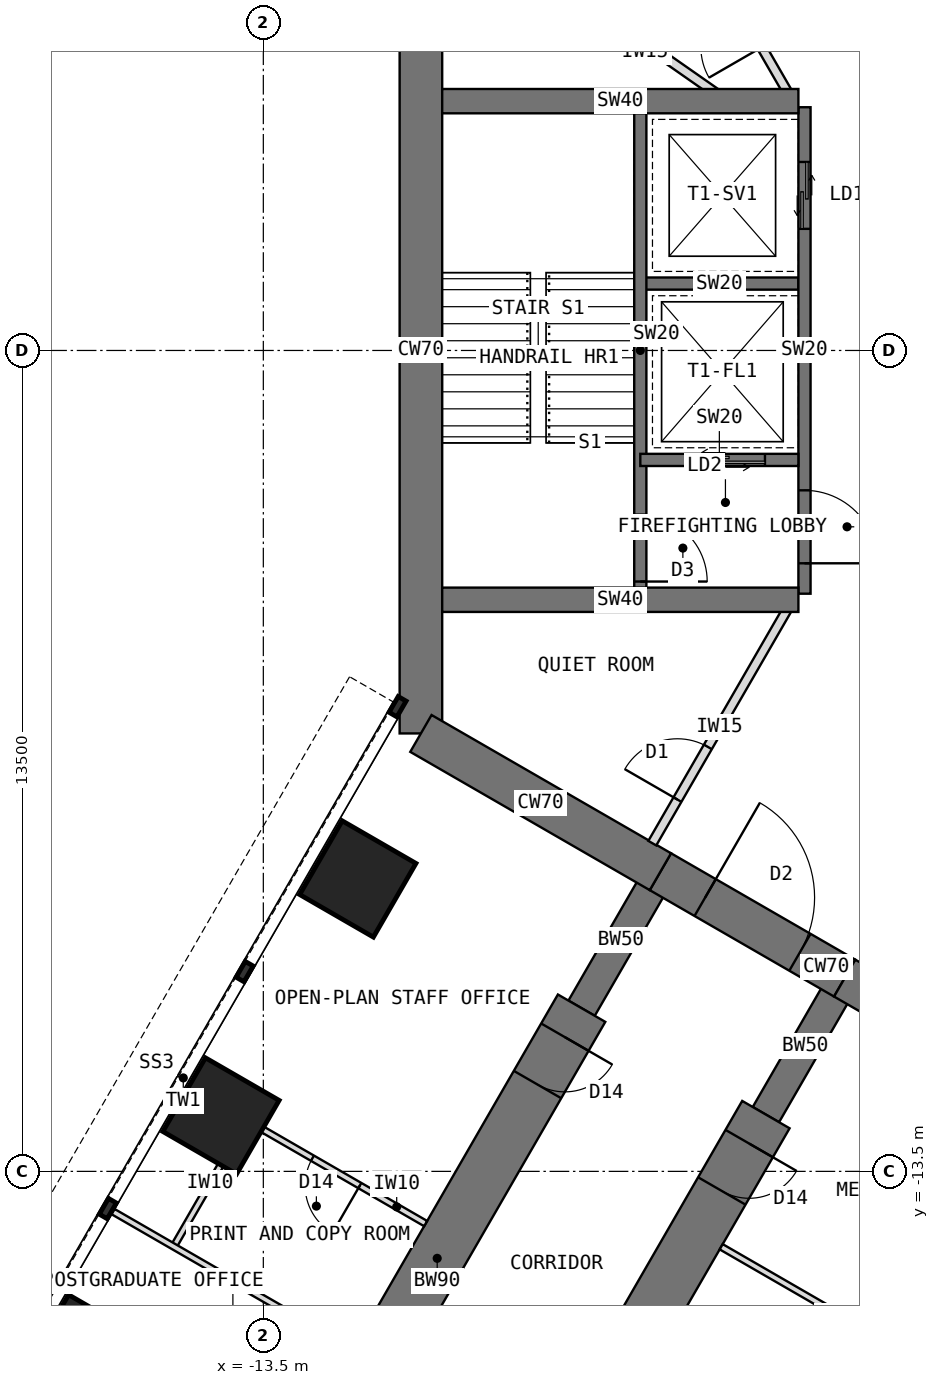
"""IFC4 building model, lengths in metres.
Left out: names, types, materials, properties, quantities, classifications, styles, units other than length and angle.
Written with IfcOpenShell. Run it as: python <this file> out.ifc"""

import sys

from ifc_helpers import new_model, si_unit, direction, frame, frame_2d, origin, origin_2d, place, context, subcontext, project, spatial, rectangle, extrude, element, fill, save


model = new_model("IFC4")
c1 = context("Model", 3, precision=1e-05, world=origin(), true_north=direction((0.0, 1.0)))
c2 = subcontext(c1, "Body", "Model", "MODEL_VIEW")
j1 = project(units=[si_unit("LENGTHUNIT", "METRE"), si_unit("PLANEANGLEUNIT", "RADIAN")], contexts=[c1])
p1 = place(None, origin())
s1 = spatial("IfcSite", under=j1, at=p1, CompositionType="ELEMENT")
p2 = place(p1, origin())
s2 = spatial("IfcBuilding", under=s1, at=p2, CompositionType="ELEMENT")
p3 = place(p2, frame((0.0, 0.0, 88.5)))
s3 = spatial("IfcBuildingStorey", under=s2, at=p3, CompositionType="ELEMENT", Elevation=88.5)
p4 = place(p3, frame((-10.908, 6.298, 0.0), z_axis=(0.0, 0.0, 1.0), x_axis=(0.0, -1.0, 0.0)))
e1 = element("IfcWall", 1, at=p4, inside=s3, PredefinedType="SHEAR", context=c2, shape_type="SweptSolid", body=[
    extrude(rectangle(XDim=12.596, YDim=0.7, at=frame_2d((6.298, 0.0))), origin(), (0.0, 0.0, 1.0), 4.0),
])
p5 = place(p3, frame((-10.908, -6.298, 0.0), z_axis=(0.0, 0.0, 1.0), x_axis=(0.866034513004, -0.499984222037, 0.0)))
e2 = element("IfcWall", 2, at=p5, inside=s3, PredefinedType="SHEAR", context=c2, shape_type="SweptSolid", body=[
    extrude(rectangle(XDim=4.548, YDim=0.7, at=frame_2d((2.274, 0.0))), origin(), (0.0, 0.0, 1.0), 4.0),
])
p6 = place(p3, frame((-6.97, -8.572, 0.0), z_axis=(0.0, 0.0, 1.0), x_axis=(0.866019471182, -0.500010275428, 0.0)))
e3 = element("IfcWall", 3, at=p6, inside=s3, PredefinedType="SHEAR", context=c2, shape_type="SweptSolid", body=[
    extrude(rectangle(XDim=3.5, YDim=0.7, at=frame_2d((1.75, 0.0))), origin(), (0.0, 0.0, 1.0), 4.0),
])
p7 = place(p6, frame((0.85, 0.0, 0.0)))
e4 = element("IfcOpeningElement", 4, at=p7, cuts=e3, PredefinedType="OPENING", context=c2, shape_type="SweptSolid", body=[
    extrude(rectangle(XDim=1.8, YDim=2.1, at=frame_2d((0.9, 1.05))), frame((0.0, 0.36, 0.0), z_axis=(0.0, -1.0, 0.0), x_axis=(1.0, 0.0, 0.0)), (0.0, 0.0, 1.0), 0.72),
])
p8 = place(p3, frame((-3.939, -10.322, 0.0), z_axis=(0.0, 0.0, 1.0), x_axis=(0.866011268655, -0.500024481964, 0.0)))
e5 = element("IfcWall", 5, at=p8, inside=s3, PredefinedType="SHEAR", context=c2, shape_type="SweptSolid", body=[
    extrude(rectangle(XDim=4.548, YDim=0.7, at=frame_2d((2.274, 0.0))), origin(), (0.0, 0.0, 1.0), 4.0),
])
p9 = place(p3, frame((-3.939, -10.322, 0.0), z_axis=(0.0, 0.0, 1.0), x_axis=(-0.499918158782, -0.866072649678, 0.0)))
e6 = element("IfcWall", 6, at=p9, inside=s3, PredefinedType="SHEAR", context=c2, shape_type="SweptSolid", body=[
    extrude(rectangle(XDim=2.592, YDim=0.5, at=frame_2d((1.296, 0.0))), origin(), (0.0, 0.0, 1.0), 4.0),
])
p10 = place(p3, frame((-5.234, -12.566, 0.0), z_axis=(0.0, 0.0, 1.0), x_axis=(-0.499997557548, -0.86602681393, 0.0)))
e7 = element("IfcWall", 7, at=p10, inside=s3, PredefinedType="SHEAR", context=c2, shape_type="SweptSolid", body=[
    extrude(rectangle(XDim=9.5, YDim=0.9, at=frame_2d((4.75, 0.0))), origin(), (0.0, 0.0, 1.0), 4.0),
])
p11 = place(p10, frame((0.55, 0.0, 0.0)))
e8 = element("IfcOpeningElement", 8, at=p11, cuts=e7, PredefinedType="OPENING", context=c2, shape_type="SweptSolid", body=[
    extrude(rectangle(XDim=0.9, YDim=2.1, at=frame_2d((0.45, 1.05))), frame((0.0, 0.46, 0.0), z_axis=(0.0, -1.0, 0.0), x_axis=(1.0, 0.0, 0.0)), (0.0, 0.0, 1.0), 0.92),
])
p12 = place(p10, frame((7.3, 0.0, 0.0)))
e9 = element("IfcOpeningElement", 9, at=p12, cuts=e7, PredefinedType="OPENING", context=c2, shape_type="SweptSolid", body=[
    extrude(rectangle(XDim=0.9, YDim=2.1, at=frame_2d((0.45, 1.05))), frame((0.0, 0.46, 0.0), z_axis=(0.0, -1.0, 0.0), x_axis=(1.0, 0.0, 0.0)), (0.0, 0.0, 1.0), 0.92),
])
p13 = place(p3, frame((-6.97, -8.572, 0.0), z_axis=(0.0, 0.0, 1.0), x_axis=(-0.499988811324, -0.866031863473, 0.0)))
e10 = element("IfcWall", 10, at=p13, inside=s3, PredefinedType="SHEAR", context=c2, shape_type="SweptSolid", body=[
    extrude(rectangle(XDim=2.592, YDim=0.5, at=frame_2d((1.296, 0.0))), origin(), (0.0, 0.0, 1.0), 4.0),
])
p14 = place(p3, frame((-8.266, -10.816, 0.0), z_axis=(0.0, 0.0, 1.0), x_axis=(-0.499997557548, -0.86602681393, 0.0)))
e11 = element("IfcWall", 11, at=p14, inside=s3, PredefinedType="SHEAR", context=c2, shape_type="SweptSolid", body=[
    extrude(rectangle(XDim=9.5, YDim=0.9, at=frame_2d((4.75, 0.0))), origin(), (0.0, 0.0, 1.0), 4.0),
])
p15 = place(p14, frame((0.55, 0.0, 0.0)))
e12 = element("IfcOpeningElement", 12, at=p15, cuts=e11, PredefinedType="OPENING", context=c2, shape_type="SweptSolid", body=[
    extrude(rectangle(XDim=0.9, YDim=2.1, at=frame_2d((0.45, 1.05))), frame((0.0, 0.46, 0.0), z_axis=(0.0, -1.0, 0.0), x_axis=(1.0, 0.0, 0.0)), (0.0, 0.0, 1.0), 0.92),
])
p16 = place(p14, frame((7.3, 0.0, 0.0)))
e13 = element("IfcOpeningElement", 13, at=p16, cuts=e11, PredefinedType="OPENING", context=c2, shape_type="SweptSolid", body=[
    extrude(rectangle(XDim=0.9, YDim=2.1, at=frame_2d((0.45, 1.05))), frame((0.0, 0.46, 0.0), z_axis=(0.0, -1.0, 0.0), x_axis=(1.0, 0.0, 0.0)), (0.0, 0.0, 1.0), 0.92),
])
for number, where, z_axis, x_axis in (
    (14, (-11.946, -8.691, 0.0), (0.0, 0.0, 1.0), (0.5, 0.866, 0.0)),
    (15, (-14.196, -12.588, 0.0), (0.0, 0.0, 1.0), (0.5, 0.866, 0.0)),
    (16, (-16.446, -16.486, 0.0), (0.0, 0.0, 1.0), (0.5, 0.866, 0.0)),
):
    element("IfcColumn", number, at=place(p3, frame(where, z_axis=z_axis, x_axis=x_axis)), inside=s3, PredefinedType="COLUMN", context=c2, shape_type="SweptSolid", body=[
        extrude(rectangle(XDim=1.4, YDim=1.4, at=origin_2d()), origin(), (0.0, 0.0, 1.0), 4.0),
    ])
p17 = place(p3, frame((-4.6, 4.0, 0.0), z_axis=(0.0, 0.0, 1.0), x_axis=(0.0, -1.0, 0.0)))
e17 = element("IfcWall", 17, at=p17, inside=s3, PredefinedType="SHEAR", context=c2, shape_type="SweptSolid", body=[
    extrude(rectangle(XDim=8.0, YDim=0.2, at=frame_2d((4.0, 0.0))), origin(), (0.0, 0.0, 1.0), 4.0),
])
p18 = place(p17, frame((6.3, 0.0, 0.0)))
e18 = element("IfcOpeningElement", 18, at=p18, cuts=e17, PredefinedType="OPENING", context=c2, shape_type="SweptSolid", body=[
    extrude(rectangle(XDim=1.2, YDim=2.1, at=frame_2d((0.6, 1.05))), frame((0.0, 0.11, 0.0), z_axis=(0.0, -1.0, 0.0), x_axis=(1.0, 0.0, 0.0)), (0.0, 0.0, 1.0), 0.22),
])
p19 = place(p17, frame((0.9, 0.0, 0.0)))
e19 = element("IfcOpeningElement", 19, at=p19, cuts=e17, PredefinedType="OPENING", context=c2, shape_type="SweptSolid", body=[
    extrude(rectangle(XDim=1.1, YDim=2.2, at=frame_2d((0.55, 1.1))), frame((0.0, 0.11, 0.0), z_axis=(0.0, -1.0, 0.0), x_axis=(1.0, 0.0, 0.0)), (0.0, 0.0, 1.0), 0.22),
])
p20 = place(p3, frame((-4.7, 1.1, 0.0), z_axis=(0.0, 0.0, 1.0), x_axis=(-1.0, 0.0, 0.0)))
e20 = element("IfcWall", 20, at=p20, inside=s3, PredefinedType="SHEAR", context=c2, shape_type="SweptSolid", body=[
    extrude(rectangle(XDim=2.6, YDim=0.2, at=frame_2d((1.3, 0.0))), origin(), (0.0, 0.0, 1.0), 4.0),
])
p21 = place(p3, frame((-4.7, -1.8, 0.0), z_axis=(0.0, 0.0, 1.0), x_axis=(-1.0, 0.0, 0.0)))
e21 = element("IfcWall", 21, at=p21, inside=s3, PredefinedType="SHEAR", context=c2, shape_type="SweptSolid", body=[
    extrude(rectangle(XDim=2.6, YDim=0.2, at=frame_2d((1.3, 0.0))), origin(), (0.0, 0.0, 1.0), 4.0),
])
p22 = place(p21, frame((0.55, 0.0, 0.0)))
e22 = element("IfcOpeningElement", 22, at=p22, cuts=e21, PredefinedType="OPENING", context=c2, shape_type="SweptSolid", body=[
    extrude(rectangle(XDim=1.3, YDim=2.2, at=frame_2d((0.65, 1.1))), frame((0.0, 0.11, 0.0), z_axis=(0.0, -1.0, 0.0), x_axis=(1.0, 0.0, 0.0)), (0.0, 0.0, 1.0), 0.22),
])
p23 = place(p3, frame((-7.3, 4.0, 0.0), z_axis=(0.0, 0.0, 1.0), x_axis=(0.0, -1.0, 0.0)))
e23 = element("IfcWall", 23, at=p23, inside=s3, PredefinedType="SHEAR", context=c2, shape_type="SweptSolid", body=[
    extrude(rectangle(XDim=8.0, YDim=0.2, at=frame_2d((4.0, 0.0))), origin(), (0.0, 0.0, 1.0), 4.0),
])
p24 = place(p23, frame((6.7, 0.0, 0.0)))
e24 = element("IfcOpeningElement", 24, at=p24, cuts=e23, PredefinedType="OPENING", context=c2, shape_type="SweptSolid", body=[
    extrude(rectangle(XDim=1.1, YDim=2.1, at=frame_2d((0.55, 1.05))), frame((0.0, 0.11, 0.0), z_axis=(0.0, -1.0, 0.0), x_axis=(1.0, 0.0, 0.0)), (0.0, 0.0, 1.0), 0.22),
])
for number, where, z_axis, x_axis in (
    (25, (-4.7, -4.1, 0.0), (0.0, 0.0, 1.0), (-1.0, 0.0, 0.0)),
    (26, (-4.7, 4.1, 0.0), (0.0, 0.0, 1.0), (-1.0, 0.0, 0.0)),
):
    element("IfcWall", number, at=place(p3, frame(where, z_axis=z_axis, x_axis=x_axis)), inside=s3, PredefinedType="SHEAR", context=c2, shape_type="SweptSolid", body=[
        extrude(rectangle(XDim=5.858, YDim=0.4, at=frame_2d((2.929, 0.0))), origin(), (0.0, 0.0, 1.0), 4.0),
    ])
p25 = place(p3, frame((-5.97, -14.74, 0.0), z_axis=(0.0, 0.0, 1.0), x_axis=(0.866035472144, -0.499982560684, 0.0)))
e27 = element("IfcWall", 27, at=p25, inside=s3, PredefinedType="PARTITIONING", context=c2, shape_type="SweptSolid", body=[
    extrude(rectangle(XDim=4.55, YDim=0.1, at=frame_2d((2.275, 0.0))), origin(), (0.0, 0.0, 1.0), 3.7),
])
p26 = place(p25, frame((3.25, 0.0, 0.0)))
e28 = element("IfcOpeningElement", 28, at=p26, cuts=e27, PredefinedType="OPENING", context=c2, shape_type="SweptSolid", body=[
    extrude(rectangle(XDim=0.9, YDim=2.1, at=frame_2d((0.45, 1.05))), frame((0.0, 0.06, 0.0), z_axis=(0.0, -1.0, 0.0), x_axis=(1.0, 0.0, 0.0)), (0.0, 0.0, 1.0), 0.12),
])
p27 = place(p3, frame((-12.03, -16.437, 0.0), z_axis=(0.0, 0.0, 1.0), x_axis=(-0.866035472144, 0.499982560684, 0.0)))
e29 = element("IfcWall", 29, at=p27, inside=s3, PredefinedType="PARTITIONING", context=c2, shape_type="SweptSolid", body=[
    extrude(rectangle(XDim=4.55, YDim=0.1, at=frame_2d((2.275, 0.0))), origin(), (0.0, 0.0, 1.0), 3.7),
])
p28 = place(p3, frame((-13.775, -12.658, 0.0), z_axis=(0.0, 0.0, 1.0), x_axis=(-0.500033551112, -0.866006032174, 0.0)))
e30 = element("IfcWall", 30, at=p28, inside=s3, PredefinedType="PARTITIONING", context=c2, shape_type="SweptSolid", body=[
    extrude(rectangle(XDim=2.4, YDim=0.1, at=frame_2d((1.2, 0.0))), origin(), (0.0, 0.0, 1.0), 3.7),
])
p29 = place(p3, frame((-10.83, -14.359, 0.0), z_axis=(0.0, 0.0, 1.0), x_axis=(-0.865989465428, 0.500062241894, 0.0)))
e31 = element("IfcWall", 31, at=p29, inside=s3, PredefinedType="PARTITIONING", context=c2, shape_type="SweptSolid", body=[
    extrude(rectangle(XDim=3.4, YDim=0.1, at=frame_2d((1.7, 0.0))), origin(), (0.0, 0.0, 1.0), 3.7),
])
p30 = place(p29, frame((1.25, 0.0, 0.0)))
e32 = element("IfcOpeningElement", 32, at=p30, cuts=e31, PredefinedType="OPENING", context=c2, shape_type="SweptSolid", body=[
    extrude(rectangle(XDim=0.9, YDim=2.1, at=frame_2d((0.45, 1.05))), frame((0.0, 0.06, 0.0), z_axis=(0.0, -1.0, 0.0), x_axis=(1.0, 0.0, 0.0)), (0.0, 0.0, 1.0), 0.12),
])
p31 = place(p3, frame((-7.103, -8.103, 0.0), z_axis=(0.0, 0.0, 1.0), x_axis=(0.500007369519, 0.866021148949, 0.0)))
e33 = element("IfcWall", 33, at=p31, inside=s3, PredefinedType="PARTITIONING", context=c2, shape_type="SweptSolid", body=[
    extrude(rectangle(XDim=4.426, YDim=0.15, at=frame_2d((2.213, 0.0))), origin(), (0.0, 0.0, 1.0), 3.7),
])
p32 = place(p31, frame((0.828, 0.0, 0.0)))
e34 = element("IfcOpeningElement", 34, at=p32, cuts=e33, PredefinedType="OPENING", context=c2, shape_type="SweptSolid", body=[
    extrude(rectangle(XDim=1.0, YDim=2.1, at=frame_2d((0.5, 1.05))), frame((0.0, 0.085, 0.0), z_axis=(0.0, -1.0, 0.0), x_axis=(1.0, 0.0, 0.0)), (0.0, 0.0, 1.0), 0.17),
])
p33 = place(p3, frame((-4.89, 4.27, 0.0), z_axis=(0.0, 0.0, 1.0), x_axis=(-0.500007369519, 0.866021148949, 0.0)))
e35 = element("IfcWall", 35, at=p33, inside=s3, PredefinedType="PARTITIONING", context=c2, shape_type="SweptSolid", body=[
    extrude(rectangle(XDim=4.426, YDim=0.15, at=frame_2d((2.213, 0.0))), origin(), (0.0, 0.0, 1.0), 3.7),
])
p34 = place(p33, frame((0.828, 0.0, 0.0)))
e36 = element("IfcOpeningElement", 36, at=p34, cuts=e35, PredefinedType="OPENING", context=c2, shape_type="SweptSolid", body=[
    extrude(rectangle(XDim=1.0, YDim=2.1, at=frame_2d((0.5, 1.05))), frame((0.0, 0.085, 0.0), z_axis=(0.0, -1.0, 0.0), x_axis=(1.0, 0.0, 0.0)), (0.0, 0.0, 1.0), 0.17),
])
p35 = place(p3, frame((-5.865, 4.1, 0.0), z_axis=(0.0, 0.0, 1.0), x_axis=(-0.819614241928, 0.572915783016, 0.0)))
e37 = element("IfcWall", 37, at=p35, inside=s3, PredefinedType="PARTITIONING", context=c2, shape_type="SweptSolid", body=[
    extrude(rectangle(XDim=4.498, YDim=0.15, at=frame_2d((2.249, 0.0))), origin(), (0.0, 0.0, 1.0), 3.7),
])
p36 = place(p35, frame((2.648, 0.0, 0.0)))
e38 = element("IfcOpeningElement", 38, at=p36, cuts=e37, PredefinedType="OPENING", context=c2, shape_type="SweptSolid", body=[
    extrude(rectangle(XDim=1.0, YDim=2.1, at=frame_2d((0.5, 1.05))), frame((0.0, 0.085, 0.0), z_axis=(0.0, -1.0, 0.0), x_axis=(1.0, 0.0, 0.0)), (0.0, 0.0, 1.0), 0.17),
])
p37 = place(p18, origin())
e39 = element("IfcDoor", 39, at=p37, inside=s3, OperationType="SINGLE_SWING_RIGHT", PredefinedType="DOOR", context=c2, shape_type="SweptSolid", body=[
    extrude(rectangle(XDim=1.2, YDim=2.1, at=frame_2d((0.6, 1.05))), frame((0.0, 0.025, 0.0), z_axis=(0.0, -1.0, 0.0), x_axis=(1.0, 0.0, 0.0)), (0.0, 0.0, 1.0), 0.05),
])
fill(e18, e39)
p38 = place(p22, origin())
e40 = element("IfcDoor", 40, at=p38, inside=s3, OperationType="DOUBLE_DOOR_SLIDING", PredefinedType="DOOR", context=c2, shape_type="SweptSolid", body=[
    extrude(rectangle(XDim=1.3, YDim=2.2, at=frame_2d((0.65, 1.1))), frame((0.0, 0.025, 0.0), z_axis=(0.0, -1.0, 0.0), x_axis=(1.0, 0.0, 0.0)), (0.0, 0.0, 1.0), 0.05),
])
fill(e22, e40)
p39 = place(p19, origin())
e41 = element("IfcDoor", 41, at=p39, inside=s3, OperationType="DOUBLE_DOOR_SLIDING", PredefinedType="DOOR", context=c2, shape_type="SweptSolid", body=[
    extrude(rectangle(XDim=1.1, YDim=2.2, at=frame_2d((0.55, 1.1))), frame((0.0, 0.025, 0.0), z_axis=(0.0, -1.0, 0.0), x_axis=(1.0, 0.0, 0.0)), (0.0, 0.0, 1.0), 0.05),
])
fill(e19, e41)
p40 = place(p24, origin())
e42 = element("IfcDoor", 42, at=p40, inside=s3, OperationType="SINGLE_SWING_RIGHT", PredefinedType="DOOR", context=c2, shape_type="SweptSolid", body=[
    extrude(rectangle(XDim=1.1, YDim=2.1, at=frame_2d((0.55, 1.05))), frame((0.0, 0.025, 0.0), z_axis=(0.0, -1.0, 0.0), x_axis=(1.0, 0.0, 0.0)), (0.0, 0.0, 1.0), 0.05),
])
fill(e24, e42)
p41 = place(p7, origin())
e43 = element("IfcDoor", 43, at=p41, inside=s3, OperationType="DOUBLE_DOOR_DOUBLE_SWING", PredefinedType="DOOR", context=c2, shape_type="SweptSolid", body=[
    extrude(rectangle(XDim=1.72, YDim=2.06, at=frame_2d((0.9, 1.03))), frame((0.0, 0.025, 0.0), z_axis=(0.0, -1.0, 0.0), x_axis=(1.0, 0.0, 0.0)), (0.0, 0.0, 1.0), 0.05),
    extrude(rectangle(XDim=0.04, YDim=2.1, at=frame_2d((0.02, 1.05))), frame((0.0, 0.35, 0.0), z_axis=(0.0, -1.0, 0.0), x_axis=(1.0, 0.0, 0.0)), (0.0, 0.0, 1.0), 0.699),
    extrude(rectangle(XDim=0.04, YDim=2.1, at=frame_2d((1.78, 1.05))), frame((0.0, 0.35, 0.0), z_axis=(0.0, -1.0, 0.0), x_axis=(1.0, 0.0, 0.0)), (0.0, 0.0, 1.0), 0.699),
    extrude(rectangle(XDim=1.72, YDim=0.04, at=frame_2d((0.9, 2.08))), frame((0.0, 0.35, 0.0), z_axis=(0.0, -1.0, 0.0), x_axis=(1.0, 0.0, 0.0)), (0.0, 0.0, 1.0), 0.699),
])
fill(e4, e43)
p42 = place(p30, origin())
e44 = element("IfcDoor", 44, at=p42, inside=s3, OperationType="SINGLE_SWING_LEFT", PredefinedType="DOOR", context=c2, shape_type="SweptSolid", body=[
    extrude(rectangle(XDim=0.9, YDim=2.1, at=frame_2d((0.45, 1.05))), frame((0.0, 0.025, 0.0), z_axis=(0.0, -1.0, 0.0), x_axis=(1.0, 0.0, 0.0)), (0.0, 0.0, 1.0), 0.05),
])
fill(e32, e44)
p43 = place(p32, origin())
e45 = element("IfcDoor", 45, at=p43, inside=s3, OperationType="SINGLE_SWING_LEFT", PredefinedType="DOOR", context=c2, shape_type="SweptSolid", body=[
    extrude(rectangle(XDim=1.0, YDim=2.1, at=frame_2d((0.5, 1.05))), frame((0.0, 0.025, 0.0), z_axis=(0.0, -1.0, 0.0), x_axis=(1.0, 0.0, 0.0)), (0.0, 0.0, 1.0), 0.05),
])
fill(e34, e45)
p44 = place(p11, origin())
e46 = element("IfcDoor", 46, at=p44, inside=s3, OperationType="SINGLE_SWING_LEFT", PredefinedType="DOOR", context=c2, shape_type="SweptSolid", body=[
    extrude(rectangle(XDim=0.82, YDim=2.06, at=frame_2d((0.45, 1.03))), frame((0.0, 0.025, 0.0), z_axis=(0.0, -1.0, 0.0), x_axis=(1.0, 0.0, 0.0)), (0.0, 0.0, 1.0), 0.05),
    extrude(rectangle(XDim=0.04, YDim=2.1, at=frame_2d((0.02, 1.05))), frame((0.0, 0.45, 0.0), z_axis=(0.0, -1.0, 0.0), x_axis=(1.0, 0.0, 0.0)), (0.0, 0.0, 1.0), 0.899),
    extrude(rectangle(XDim=0.04, YDim=2.1, at=frame_2d((0.88, 1.05))), frame((0.0, 0.45, 0.0), z_axis=(0.0, -1.0, 0.0), x_axis=(1.0, 0.0, 0.0)), (0.0, 0.0, 1.0), 0.899),
    extrude(rectangle(XDim=0.82, YDim=0.04, at=frame_2d((0.45, 2.08))), frame((0.0, 0.45, 0.0), z_axis=(0.0, -1.0, 0.0), x_axis=(1.0, 0.0, 0.0)), (0.0, 0.0, 1.0), 0.899),
])
fill(e8, e46)
p45 = place(p15, origin())
e47 = element("IfcDoor", 47, at=p45, inside=s3, OperationType="SINGLE_SWING_LEFT", PredefinedType="DOOR", context=c2, shape_type="SweptSolid", body=[
    extrude(rectangle(XDim=0.82, YDim=2.06, at=frame_2d((0.45, 1.03))), frame((0.0, 0.025, 0.0), z_axis=(0.0, -1.0, 0.0), x_axis=(1.0, 0.0, 0.0)), (0.0, 0.0, 1.0), 0.05),
    extrude(rectangle(XDim=0.04, YDim=2.1, at=frame_2d((0.02, 1.05))), frame((0.0, 0.45, 0.0), z_axis=(0.0, -1.0, 0.0), x_axis=(1.0, 0.0, 0.0)), (0.0, 0.0, 1.0), 0.899),
    extrude(rectangle(XDim=0.04, YDim=2.1, at=frame_2d((0.88, 1.05))), frame((0.0, 0.45, 0.0), z_axis=(0.0, -1.0, 0.0), x_axis=(1.0, 0.0, 0.0)), (0.0, 0.0, 1.0), 0.899),
    extrude(rectangle(XDim=0.82, YDim=0.04, at=frame_2d((0.45, 2.08))), frame((0.0, 0.45, 0.0), z_axis=(0.0, -1.0, 0.0), x_axis=(1.0, 0.0, 0.0)), (0.0, 0.0, 1.0), 0.899),
])
fill(e12, e47)
save(model, sys.argv[1])
